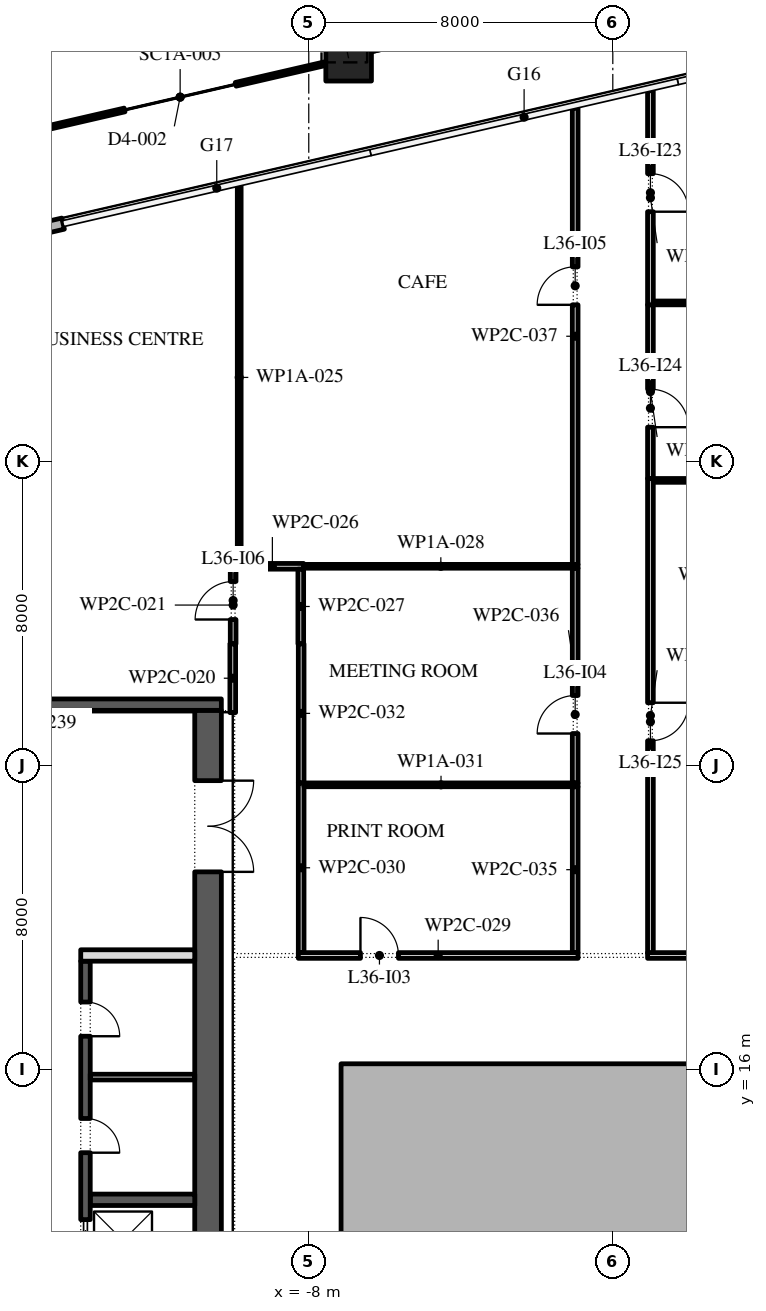
"""IFC4 building model, lengths in metres.
Left out: names, types, materials, properties, quantities, classifications, styles, units other than length and angle.
Written with IfcOpenShell. Run it as: python <this file> out.ifc"""

import sys

from ifc_helpers import new_model, si_unit, direction, frame, frame_2d, origin, origin_2d, place, context, subcontext, project, spatial, polyline, rectangle, outline, extrude, element, fill, save


model = new_model("IFC4")
c1 = context("Model", 3, precision=1e-05, world=origin(), true_north=direction((0.0, 1.0)))
c2 = subcontext(c1, "Body", "Model", "MODEL_VIEW")
j1 = project(units=[si_unit("LENGTHUNIT", "METRE"), si_unit("PLANEANGLEUNIT", "RADIAN")], contexts=[c1])
p1 = place(None, origin())
s1 = spatial("IfcSite", under=j1, at=p1, CompositionType="ELEMENT")
p2 = place(p1, origin())
s2 = spatial("IfcBuilding", under=s1, at=p2, CompositionType="ELEMENT")
p3 = place(p2, frame((0.0, 0.0, 165.6)))
s3 = spatial("IfcBuildingStorey", under=s2, at=p3, CompositionType="ELEMENT", Elevation=165.6)
p4 = place(p3, frame((-6.951, 42.608, 0.0), z_axis=(-0.018854392659, 0.081621274029, 0.996485062358), x_axis=(-0.974342226267, -0.225071602193, 0.0)))
e1 = element("IfcColumn", 1, at=p4, inside=s3, PredefinedType="COLUMN", context=c2, shape_type="SweptSolid", body=[
    extrude(rectangle(XDim=1.2, YDim=1.2, at=origin_2d()), origin(), (0.0, 0.0, 1.0), 6.021),
])
p5 = place(p3, origin())
e2 = element("IfcWall", 2, at=p5, inside=s3, PredefinedType="STANDARD", context=c2, shape_type="SweptSolid", body=[
    extrude(outline(polyline([(-7.15, -2.15), (7.15, -2.15), (7.15, 16.15), (-7.15, 16.15), (-7.15, -2.15)]), holes=[polyline([(-7.0, -2.0), (-7.0, 16.0), (7.0, 16.0), (7.0, -2.0), (-7.0, -2.0)])]), origin(), (0.0, 0.0, 1.0), 5.8),
])
p6 = place(p3, frame((-14.465, 38.256, 0.0), z_axis=(0.0, 0.0, 1.0), x_axis=(-0.974368386566, -0.224958323385, 0.0)))
e3 = element("IfcWall", 3, at=p6, inside=s3, PredefinedType="STANDARD", context=c2, shape_type="SweptSolid", body=[
    extrude(rectangle(XDim=8.3, YDim=0.3, at=frame_2d((4.15, 0.0))), origin(), (0.0, 0.0, 1.0), 5.8),
])
p7 = place(p6, frame((3.9, 0.0, 0.0)))
e4 = element("IfcOpeningElement", 4, at=p7, cuts=e3, PredefinedType="OPENING", context=c2, shape_type="SweptSolid", body=[
    extrude(rectangle(XDim=3.0, YDim=3.5, at=frame_2d((1.5, 1.75))), frame((0.0, 0.16, 0.0), z_axis=(0.0, -1.0, 0.0), x_axis=(1.0, 0.0, 0.0)), (0.0, 0.0, 1.0), 0.32),
])
p8 = place(p3, frame((-7.555, 42.469, 0.0), z_axis=(0.0, 0.0, 1.0), x_axis=(-0.974370774795, -0.22494797893, 0.0)))
e5 = element("IfcWall", 5, at=p8, inside=s3, PredefinedType="STANDARD", context=c2, shape_type="SweptSolid", body=[
    extrude(rectangle(XDim=7.86, YDim=0.1, at=frame_2d((3.93, 0.0))), origin(), (0.0, 0.0, 1.0), 5.8),
])
p9 = place(p8, frame((2.43, 0.0, 0.0)))
e6 = element("IfcOpeningElement", 6, at=p9, cuts=e5, PredefinedType="OPENING", context=c2, shape_type="SweptSolid", body=[
    extrude(rectangle(XDim=3.0, YDim=3.5, at=frame_2d((1.5, 1.75))), frame((0.0, 0.06, 0.0), z_axis=(0.0, -1.0, 0.0), x_axis=(1.0, 0.0, 0.0)), (0.0, 0.0, 1.0), 0.12),
])
p10 = place(p3, frame((-10.65, -2.45, 0.0), z_axis=(0.0, 0.0, 1.0), x_axis=(0.0, 1.0, 0.0)))
e7 = element("IfcWall", 7, at=p10, inside=s3, PredefinedType="SHEAR", context=c2, shape_type="SweptSolid", body=[
    extrude(rectangle(XDim=27.9, YDim=0.7, at=frame_2d((13.95, 0.0))), origin(), (0.0, 0.0, 1.0), 5.8),
])
p11 = place(p10, frame((23.65, 0.0, 0.0)))
e8 = element("IfcOpeningElement", 8, at=p11, cuts=e7, PredefinedType="OPENING", context=c2, shape_type="SweptSolid", body=[
    extrude(rectangle(XDim=2.4, YDim=2.1, at=frame_2d((1.2, 1.05))), frame((0.0, 0.36, 0.0), z_axis=(0.0, -1.0, 0.0), x_axis=(1.0, 0.0, 0.0)), (0.0, 0.0, 1.0), 0.72),
])
p12 = place(p10, frame((1.087, 0.0, 0.0)))
e9 = element("IfcOpeningElement", 9, at=p12, cuts=e7, PredefinedType="OPENING", context=c2, shape_type="SweptSolid", body=[
    extrude(rectangle(XDim=0.9, YDim=2.1, at=frame_2d((0.45, 1.05))), frame((0.0, 0.36, 0.0), z_axis=(0.0, -1.0, 0.0), x_axis=(1.0, 0.0, 0.0)), (0.0, 0.0, 1.0), 0.72),
])
p13 = place(p10, frame((4.262, 0.0, 0.0)))
e10 = element("IfcOpeningElement", 10, at=p13, cuts=e7, PredefinedType="OPENING", context=c2, shape_type="SweptSolid", body=[
    extrude(rectangle(XDim=1.0, YDim=2.1, at=frame_2d((0.5, 1.05))), frame((0.0, 0.36, 0.0), z_axis=(0.0, -1.0, 0.0), x_axis=(1.0, 0.0, 0.0)), (0.0, 0.0, 1.0), 0.72),
])
p14 = place(p3, frame((-21.7, 25.6, 0.0), z_axis=(0.0, 0.0, 1.0), x_axis=(1.0, 0.0, 0.0)))
e11 = element("IfcWall", 11, at=p14, inside=s3, PredefinedType="SHEAR", context=c2, shape_type="SweptSolid", body=[
    extrude(rectangle(XDim=11.4, YDim=0.3, at=frame_2d((5.7, 0.0))), origin(), (0.0, 0.0, 1.0), 5.8),
])
p15 = place(p3, frame((-13.75, 12.571, 0.0), z_axis=(0.0, 0.0, 1.0), x_axis=(1.0, 0.0, 0.0)))
e12 = element("IfcWall", 12, at=p15, inside=s3, PredefinedType="SHEAR", context=c2, shape_type="SweptSolid", body=[
    extrude(rectangle(XDim=2.75, YDim=0.3, at=frame_2d((1.375, 0.0))), origin(), (0.0, 0.0, 1.0), 5.8),
])
p16 = place(p3, frame((-13.875, -2.45, 0.0), z_axis=(0.0, 0.0, 1.0), x_axis=(0.0, 1.0, 0.0)))
e13 = element("IfcWall", 13, at=p16, inside=s3, PredefinedType="SHEAR", context=c2, shape_type="SweptSolid", body=[
    extrude(rectangle(XDim=21.3, YDim=0.25, at=frame_2d((10.65, 0.0))), origin(), (0.0, 0.0, 1.0), 5.8),
])
p17 = place(p16, frame((16.261, 0.0, 0.0)))
e14 = element("IfcOpeningElement", 14, at=p17, cuts=e13, PredefinedType="OPENING", context=c2, shape_type="SweptSolid", body=[
    extrude(rectangle(XDim=0.9, YDim=2.1, at=frame_2d((0.45, 1.05))), frame((0.0, 0.135, 0.0), z_axis=(0.0, -1.0, 0.0), x_axis=(1.0, 0.0, 0.0)), (0.0, 0.0, 1.0), 0.27),
])
p18 = place(p16, frame((19.325, 0.0, 0.0)))
e15 = element("IfcOpeningElement", 15, at=p18, cuts=e13, PredefinedType="OPENING", context=c2, shape_type="SweptSolid", body=[
    extrude(rectangle(XDim=0.9, YDim=2.1, at=frame_2d((0.45, 1.05))), frame((0.0, 0.135, 0.0), z_axis=(0.0, -1.0, 0.0), x_axis=(1.0, 0.0, 0.0)), (0.0, 0.0, 1.0), 0.27),
])
p19 = place(p16, frame((6.971, 0.0, 0.0)))
e16 = element("IfcOpeningElement", 16, at=p19, cuts=e13, PredefinedType="OPENING", context=c2, shape_type="SweptSolid", body=[
    extrude(rectangle(XDim=1.1, YDim=2.1, at=frame_2d((0.55, 1.05))), frame((0.0, 0.135, 0.0), z_axis=(0.0, -1.0, 0.0), x_axis=(1.0, 0.0, 0.0)), (0.0, 0.0, 1.0), 0.27),
])
p20 = place(p16, frame((9.114, 0.0, 0.0)))
e17 = element("IfcOpeningElement", 17, at=p20, cuts=e13, PredefinedType="OPENING", context=c2, shape_type="SweptSolid", body=[
    extrude(rectangle(XDim=1.1, YDim=2.1, at=frame_2d((0.55, 1.05))), frame((0.0, 0.135, 0.0), z_axis=(0.0, -1.0, 0.0), x_axis=(1.0, 0.0, 0.0)), (0.0, 0.0, 1.0), 0.27),
])
p21 = place(p16, frame((11.257, 0.0, 0.0)))
e18 = element("IfcOpeningElement", 18, at=p21, cuts=e13, PredefinedType="OPENING", context=c2, shape_type="SweptSolid", body=[
    extrude(rectangle(XDim=1.1, YDim=2.1, at=frame_2d((0.55, 1.05))), frame((0.0, 0.135, 0.0), z_axis=(0.0, -1.0, 0.0), x_axis=(1.0, 0.0, 0.0)), (0.0, 0.0, 1.0), 0.27),
])
p22 = place(p16, frame((13.4, 0.0, 0.0)))
e19 = element("IfcOpeningElement", 19, at=p22, cuts=e13, PredefinedType="OPENING", context=c2, shape_type="SweptSolid", body=[
    extrude(rectangle(XDim=1.1, YDim=2.1, at=frame_2d((0.55, 1.05))), frame((0.0, 0.135, 0.0), z_axis=(0.0, -1.0, 0.0), x_axis=(1.0, 0.0, 0.0)), (0.0, 0.0, 1.0), 0.27),
])
p23 = place(p3, frame((-14.0, 19.0, 0.0), z_axis=(0.0, 0.0, 1.0), x_axis=(1.0, 0.0, 0.0)))
e20 = element("IfcWall", 20, at=p23, inside=s3, PredefinedType="PARTITIONING", context=c2, shape_type="SweptSolid", body=[
    extrude(rectangle(XDim=3.0, YDim=0.3, at=frame_2d((1.5, 0.0))), origin(), (0.0, 0.0, 1.0), 5.8),
])
p24 = place(p3, frame((-13.75, 15.8, 0.0), z_axis=(0.0, 0.0, 1.0), x_axis=(1.0, 0.0, 0.0)))
e21 = element("IfcWall", 21, at=p24, inside=s3, PredefinedType="PARTITIONING", context=c2, shape_type="SweptSolid", body=[
    extrude(rectangle(XDim=2.75, YDim=0.15, at=frame_2d((1.375, 0.0))), origin(), (0.0, 0.0, 1.0), 5.8),
])
p25 = place(p3, frame((-10.0, 25.39, 0.0), z_axis=(0.0, 0.0, 1.0), x_axis=(0.0, 1.0, 0.0)))
e22 = element("IfcWall", 22, at=p25, inside=s3, PredefinedType="PARTITIONING", context=c2, shape_type="SweptSolid", body=[
    extrude(rectangle(XDim=1.81, YDim=0.15, at=frame_2d((0.905, 0.0))), origin(), (0.0, 0.0, 1.0), 5.8),
])
p26 = place(p3, frame((-9.99, 27.2, 0.0), z_axis=(0.0, 0.0, 1.0), x_axis=(0.0, 1.0, 0.0)))
e23 = element("IfcWall", 23, at=p26, inside=s3, PredefinedType="PARTITIONING", context=c2, shape_type="SweptSolid", body=[
    extrude(rectangle(XDim=2.04, YDim=0.15, at=frame_2d((1.02, 0.0))), origin(), (0.0, 0.0, 1.0), 5.8),
])
p27 = place(p26, frame((0.64, 0.0, 0.0)))
e24 = element("IfcOpeningElement", 24, at=p27, cuts=e23, PredefinedType="OPENING", context=c2, shape_type="SweptSolid", body=[
    extrude(rectangle(XDim=1.0, YDim=2.1, at=frame_2d((0.5, 1.05))), frame((0.0, 0.085, 0.0), z_axis=(0.0, -1.0, 0.0), x_axis=(1.0, 0.0, 0.0)), (0.0, 0.0, 1.0), 0.17),
])
p28 = place(p3, frame((-9.83, 29.165, 0.0), z_axis=(0.0, 0.0, 1.0), x_axis=(0.0, 1.0, 0.0)))
e25 = element("IfcWall", 25, at=p28, inside=s3, PredefinedType="PARTITIONING", context=c2, shape_type="SweptSolid", body=[
    extrude(rectangle(XDim=10.09, YDim=0.1, at=frame_2d((5.045, 0.0))), origin(), (0.0, 0.0, 1.0), 5.8),
])
p29 = place(p3, frame((-9.78, 29.24, 0.0), z_axis=(0.0, 0.0, 1.0), x_axis=(1.0, 0.0, 0.0)))
e26 = element("IfcWall", 26, at=p29, inside=s3, PredefinedType="PARTITIONING", context=c2, shape_type="SweptSolid", body=[
    extrude(rectangle(XDim=1.645, YDim=0.15, at=frame_2d((0.823, 0.0))), origin(), (0.0, 0.0, 1.0), 5.8),
])
p30 = place(p3, frame((-8.21, 29.165, 0.0), z_axis=(0.0, 0.0, 1.0), x_axis=(0.0, -1.0, 0.0)))
e27 = element("IfcWall", 27, at=p30, inside=s3, PredefinedType="PARTITIONING", context=c2, shape_type="SweptSolid", body=[
    extrude(rectangle(XDim=1.965, YDim=0.15, at=frame_2d((0.982, 0.0))), origin(), (0.0, 0.0, 1.0), 5.8),
])
p31 = place(p3, frame((-8.135, 29.24, 0.0), z_axis=(0.0, 0.0, 1.0), x_axis=(1.0, 0.0, 0.0)))
e28 = element("IfcWall", 28, at=p31, inside=s3, PredefinedType="PARTITIONING", context=c2, shape_type="SweptSolid", body=[
    extrude(rectangle(XDim=7.22, YDim=0.1, at=frame_2d((3.61, 0.0))), origin(), (0.0, 0.0, 1.0), 5.8),
])
p32 = place(p3, frame((-8.275, 19.0, 0.0), z_axis=(0.0, 0.0, 1.0), x_axis=(1.0, 0.0, 0.0)))
e29 = element("IfcWall", 29, at=p32, inside=s3, PredefinedType="PARTITIONING", context=c2, shape_type="SweptSolid", body=[
    extrude(rectangle(XDim=7.36, YDim=0.15, at=frame_2d((3.68, 0.0))), origin(), (0.0, 0.0, 1.0), 5.8),
])
p33 = place(p32, frame((1.635, 0.0, 0.0)))
e30 = element("IfcOpeningElement", 30, at=p33, cuts=e29, PredefinedType="OPENING", context=c2, shape_type="SweptSolid", body=[
    extrude(rectangle(XDim=1.0, YDim=2.1, at=frame_2d((0.5, 1.05))), frame((0.0, 0.085, 0.0), z_axis=(0.0, -1.0, 0.0), x_axis=(1.0, 0.0, 0.0)), (0.0, 0.0, 1.0), 0.17),
])
p34 = place(p3, frame((-8.2, 23.54, 0.0), z_axis=(0.0, 0.0, 1.0), x_axis=(0.0, -1.0, 0.0)))
e31 = element("IfcWall", 31, at=p34, inside=s3, PredefinedType="PARTITIONING", context=c2, shape_type="SweptSolid", body=[
    extrude(rectangle(XDim=4.465, YDim=0.15, at=frame_2d((2.232, 0.0))), origin(), (0.0, 0.0, 1.0), 5.8),
])
p35 = place(p3, frame((-8.125, 23.49, 0.0), z_axis=(0.0, 0.0, 1.0), x_axis=(1.0, 0.0, 0.0)))
e32 = element("IfcWall", 32, at=p35, inside=s3, PredefinedType="PARTITIONING", context=c2, shape_type="SweptSolid", body=[
    extrude(rectangle(XDim=7.21, YDim=0.1, at=frame_2d((3.605, 0.0))), origin(), (0.0, 0.0, 1.0), 5.8),
])
p36 = place(p3, frame((-8.2, 27.2, 0.0), z_axis=(0.0, 0.0, 1.0), x_axis=(0.0, -1.0, 0.0)))
e33 = element("IfcWall", 33, at=p36, inside=s3, PredefinedType="PARTITIONING", context=c2, shape_type="SweptSolid", body=[
    extrude(rectangle(XDim=3.66, YDim=0.15, at=frame_2d((1.83, 0.0))), origin(), (0.0, 0.0, 1.0), 5.8),
])
p37 = place(p3, frame((-0.99, 19.075, 0.0), z_axis=(0.0, 0.0, 1.0), x_axis=(0.0, 1.0, 0.0)))
e34 = element("IfcWall", 34, at=p37, inside=s3, PredefinedType="PARTITIONING", context=c2, shape_type="SweptSolid", body=[
    extrude(rectangle(XDim=4.365, YDim=0.15, at=frame_2d((2.183, 0.0))), origin(), (0.0, 0.0, 1.0), 5.8),
])
p38 = place(p3, frame((-0.99, 23.54, 0.0), z_axis=(0.0, 0.0, 1.0), x_axis=(0.0, 1.0, 0.0)))
e35 = element("IfcWall", 35, at=p38, inside=s3, PredefinedType="PARTITIONING", context=c2, shape_type="SweptSolid", body=[
    extrude(rectangle(XDim=5.65, YDim=0.15, at=frame_2d((2.825, 0.0))), origin(), (0.0, 0.0, 1.0), 5.8),
])
p39 = place(p38, frame((1.3, 0.0, 0.0)))
e36 = element("IfcOpeningElement", 36, at=p39, cuts=e35, PredefinedType="OPENING", context=c2, shape_type="SweptSolid", body=[
    extrude(rectangle(XDim=1.0, YDim=2.1, at=frame_2d((0.5, 1.05))), frame((0.0, 0.085, 0.0), z_axis=(0.0, -1.0, 0.0), x_axis=(1.0, 0.0, 0.0)), (0.0, 0.0, 1.0), 0.17),
])
p40 = place(p3, frame((-0.99, 29.29, 0.0), z_axis=(0.0, 0.0, 1.0), x_axis=(0.0, 1.0, 0.0)))
e37 = element("IfcWall", 37, at=p40, inside=s3, PredefinedType="PARTITIONING", context=c2, shape_type="SweptSolid", body=[
    extrude(rectangle(XDim=12.006, YDim=0.15, at=frame_2d((6.003, 0.0))), origin(), (0.0, 0.0, 1.0), 5.8),
])
p41 = place(p40, frame((6.83, 0.0, 0.0)))
e38 = element("IfcOpeningElement", 38, at=p41, cuts=e37, PredefinedType="OPENING", context=c2, shape_type="SweptSolid", body=[
    extrude(rectangle(XDim=1.0, YDim=2.1, at=frame_2d((0.5, 1.05))), frame((0.0, 0.085, 0.0), z_axis=(0.0, -1.0, 0.0), x_axis=(1.0, 0.0, 0.0)), (0.0, 0.0, 1.0), 0.17),
])
p42 = place(p3, frame((0.915, 19.0, 0.0), z_axis=(0.0, 0.0, 1.0), x_axis=(1.0, 0.0, 0.0)))
e39 = element("IfcWall", 39, at=p42, inside=s3, PredefinedType="PARTITIONING", context=c2, shape_type="SweptSolid", body=[
    extrude(rectangle(XDim=7.36, YDim=0.15, at=frame_2d((3.68, 0.0))), origin(), (0.0, 0.0, 1.0), 5.8),
])
p43 = place(p3, frame((0.99, 31.55, 0.0), z_axis=(0.0, 0.0, 1.0), x_axis=(0.0, -1.0, 0.0)))
e40 = element("IfcWall", 40, at=p43, inside=s3, PredefinedType="PARTITIONING", context=c2, shape_type="SweptSolid", body=[
    extrude(rectangle(XDim=12.475, YDim=0.15, at=frame_2d((6.238, 0.0))), origin(), (0.0, 0.0, 1.0), 5.8),
])
p44 = place(p43, frame((5.9, 0.0, 0.0)))
e41 = element("IfcOpeningElement", 41, at=p44, cuts=e40, PredefinedType="OPENING", context=c2, shape_type="SweptSolid", body=[
    extrude(rectangle(XDim=1.0, YDim=2.1, at=frame_2d((0.5, 1.05))), frame((0.0, 0.085, 0.0), z_axis=(0.0, -1.0, 0.0), x_axis=(1.0, 0.0, 0.0)), (0.0, 0.0, 1.0), 0.17),
])
p45 = place(p3, frame((0.99, 36.12, 0.0), z_axis=(0.0, 0.0, 1.0), x_axis=(0.0, -1.0, 0.0)))
e42 = element("IfcWall", 42, at=p45, inside=s3, PredefinedType="PARTITIONING", context=c2, shape_type="SweptSolid", body=[
    extrude(rectangle(XDim=4.57, YDim=0.15, at=frame_2d((2.285, 0.0))), origin(), (0.0, 0.0, 1.0), 5.8),
])
p46 = place(p45, frame((2.22, 0.0, 0.0)))
e43 = element("IfcOpeningElement", 43, at=p46, cuts=e42, PredefinedType="OPENING", context=c2, shape_type="SweptSolid", body=[
    extrude(rectangle(XDim=1.0, YDim=2.1, at=frame_2d((0.5, 1.05))), frame((0.0, 0.085, 0.0), z_axis=(0.0, -1.0, 0.0), x_axis=(1.0, 0.0, 0.0)), (0.0, 0.0, 1.0), 0.17),
])
p47 = place(p3, frame((0.99, 41.753, 0.0), z_axis=(0.0, 0.0, 1.0), x_axis=(0.0, -1.0, 0.0)))
e44 = element("IfcWall", 44, at=p47, inside=s3, PredefinedType="PARTITIONING", context=c2, shape_type="SweptSolid", body=[
    extrude(rectangle(XDim=5.633, YDim=0.15, at=frame_2d((2.816, 0.0))), origin(), (0.0, 0.0, 1.0), 5.8),
])
p48 = place(p47, frame((2.183, 0.0, 0.0)))
e45 = element("IfcOpeningElement", 45, at=p48, cuts=e44, PredefinedType="OPENING", context=c2, shape_type="SweptSolid", body=[
    extrude(rectangle(XDim=1.0, YDim=2.1, at=frame_2d((0.5, 1.05))), frame((0.0, 0.085, 0.0), z_axis=(0.0, -1.0, 0.0), x_axis=(1.0, 0.0, 0.0)), (0.0, 0.0, 1.0), 0.17),
])
p49 = place(p3, frame((6.39, 36.17, 0.0), z_axis=(0.0, 0.0, 1.0), x_axis=(-1.0, 0.0, 0.0)))
e46 = element("IfcWall", 46, at=p49, inside=s3, PredefinedType="PARTITIONING", context=c2, shape_type="SweptSolid", body=[
    extrude(rectangle(XDim=5.325, YDim=0.1, at=frame_2d((2.663, 0.0))), origin(), (0.0, 0.0, 1.0), 5.8),
])
p50 = place(p3, frame((14.48, 31.5, 0.0), z_axis=(0.0, 0.0, 1.0), x_axis=(-1.0, 0.0, 0.0)))
e47 = element("IfcWall", 47, at=p50, inside=s3, PredefinedType="PARTITIONING", context=c2, shape_type="SweptSolid", body=[
    extrude(rectangle(XDim=13.415, YDim=0.1, at=frame_2d((6.708, 0.0))), origin(), (0.0, 0.0, 1.0), 5.8),
])
p51 = place(p9, origin())
e48 = element("IfcDoor", 48, at=p51, inside=s3, OperationType="DOUBLE_DOOR_SLIDING", PredefinedType="DOOR", context=c2, shape_type="SweptSolid", body=[
    extrude(rectangle(XDim=3.0, YDim=3.5, at=frame_2d((1.5, 1.75))), frame((0.0, 0.025, 0.0), z_axis=(0.0, -1.0, 0.0), x_axis=(1.0, 0.0, 0.0)), (0.0, 0.0, 1.0), 0.05),
])
fill(e6, e48)
p52 = place(p17, frame((0.9, -0.2, 0.0), z_axis=(0.0, 0.0, 1.0), x_axis=(-1.0, 0.0, 0.0)))
e49 = element("IfcDoor", 49, at=p52, inside=s3, OperationType="SINGLE_SWING_LEFT", PredefinedType="DOOR", context=c2, shape_type="SweptSolid", body=[
    extrude(rectangle(XDim=0.9, YDim=2.1, at=frame_2d((0.45, 1.05))), frame((0.0, -0.075, 0.0), z_axis=(0.0, -1.0, 0.0), x_axis=(1.0, 0.0, 0.0)), (0.0, 0.0, 1.0), 0.05),
])
fill(e14, e49)
p53 = place(p18, frame((0.9, -0.2, 0.0), z_axis=(0.0, 0.0, 1.0), x_axis=(-1.0, 0.0, 0.0)))
e50 = element("IfcDoor", 50, at=p53, inside=s3, OperationType="SINGLE_SWING_LEFT", PredefinedType="DOOR", context=c2, shape_type="SweptSolid", body=[
    extrude(rectangle(XDim=0.9, YDim=2.1, at=frame_2d((0.45, 1.05))), frame((0.0, -0.075, 0.0), z_axis=(0.0, -1.0, 0.0), x_axis=(1.0, 0.0, 0.0)), (0.0, 0.0, 1.0), 0.05),
])
fill(e15, e50)
p54 = place(p22, origin())
e51 = element("IfcDoor", 51, at=p54, inside=s3, OperationType="SLIDING_TO_LEFT", PredefinedType="DOOR", context=c2, shape_type="SweptSolid", body=[
    extrude(rectangle(XDim=1.1, YDim=2.1, at=frame_2d((0.55, 1.05))), frame((0.0, 0.025, 0.0), z_axis=(0.0, -1.0, 0.0), x_axis=(1.0, 0.0, 0.0)), (0.0, 0.0, 1.0), 0.05),
])
fill(e19, e51)
p55 = place(p11, frame((2.4, 0.0, 0.0), z_axis=(0.0, 0.0, 1.0), x_axis=(-1.0, 0.0, 0.0)))
e52 = element("IfcDoor", 52, at=p55, inside=s3, OperationType="DOUBLE_DOOR_SINGLE_SWING", PredefinedType="DOOR", context=c2, shape_type="SweptSolid", body=[
    extrude(rectangle(XDim=2.4, YDim=2.1, at=frame_2d((1.2, 1.05))), frame((0.0, 0.025, 0.0), z_axis=(0.0, -1.0, 0.0), x_axis=(1.0, 0.0, 0.0)), (0.0, 0.0, 1.0), 0.05),
])
fill(e8, e52)
p56 = place(p33, origin())
e53 = element("IfcDoor", 53, at=p56, inside=s3, OperationType="SINGLE_SWING_RIGHT", PredefinedType="DOOR", context=c2, shape_type="SweptSolid", body=[
    extrude(rectangle(XDim=1.0, YDim=2.1, at=frame_2d((0.5, 1.05))), frame((0.0, 0.025, 0.0), z_axis=(0.0, -1.0, 0.0), x_axis=(1.0, 0.0, 0.0)), (0.0, 0.0, 1.0), 0.05),
])
fill(e30, e53)
p57 = place(p39, origin())
e54 = element("IfcDoor", 54, at=p57, inside=s3, OperationType="SINGLE_SWING_RIGHT", PredefinedType="DOOR", context=c2, shape_type="SweptSolid", body=[
    extrude(rectangle(XDim=1.0, YDim=2.1, at=frame_2d((0.5, 1.05))), frame((0.0, 0.025, 0.0), z_axis=(0.0, -1.0, 0.0), x_axis=(1.0, 0.0, 0.0)), (0.0, 0.0, 1.0), 0.05),
])
fill(e36, e54)
p58 = place(p41, origin())
e55 = element("IfcDoor", 55, at=p58, inside=s3, OperationType="SINGLE_SWING_RIGHT", PredefinedType="DOOR", context=c2, shape_type="SweptSolid", body=[
    extrude(rectangle(XDim=1.0, YDim=2.1, at=frame_2d((0.5, 1.05))), frame((0.0, 0.025, 0.0), z_axis=(0.0, -1.0, 0.0), x_axis=(1.0, 0.0, 0.0)), (0.0, 0.0, 1.0), 0.05),
])
fill(e38, e55)
p59 = place(p27, origin())
e56 = element("IfcDoor", 56, at=p59, inside=s3, OperationType="SINGLE_SWING_RIGHT", PredefinedType="DOOR", context=c2, shape_type="SweptSolid", body=[
    extrude(rectangle(XDim=1.0, YDim=2.1, at=frame_2d((0.5, 1.05))), frame((0.0, 0.025, 0.0), z_axis=(0.0, -1.0, 0.0), x_axis=(1.0, 0.0, 0.0)), (0.0, 0.0, 1.0), 0.05),
])
fill(e24, e56)
p60 = place(p48, origin())
e57 = element("IfcDoor", 57, at=p60, inside=s3, OperationType="SINGLE_SWING_LEFT", PredefinedType="DOOR", context=c2, shape_type="SweptSolid", body=[
    extrude(rectangle(XDim=1.0, YDim=2.1, at=frame_2d((0.5, 1.05))), frame((0.0, 0.025, 0.0), z_axis=(0.0, -1.0, 0.0), x_axis=(1.0, 0.0, 0.0)), (0.0, 0.0, 1.0), 0.05),
])
fill(e45, e57)
p61 = place(p46, origin())
e58 = element("IfcDoor", 58, at=p61, inside=s3, OperationType="SINGLE_SWING_LEFT", PredefinedType="DOOR", context=c2, shape_type="SweptSolid", body=[
    extrude(rectangle(XDim=1.0, YDim=2.1, at=frame_2d((0.5, 1.05))), frame((0.0, 0.025, 0.0), z_axis=(0.0, -1.0, 0.0), x_axis=(1.0, 0.0, 0.0)), (0.0, 0.0, 1.0), 0.05),
])
fill(e43, e58)
p62 = place(p44, origin())
e59 = element("IfcDoor", 59, at=p62, inside=s3, OperationType="SINGLE_SWING_RIGHT", PredefinedType="DOOR", context=c2, shape_type="SweptSolid", body=[
    extrude(rectangle(XDim=1.0, YDim=2.1, at=frame_2d((0.5, 1.05))), frame((0.0, 0.025, 0.0), z_axis=(0.0, -1.0, 0.0), x_axis=(1.0, 0.0, 0.0)), (0.0, 0.0, 1.0), 0.05),
])
fill(e41, e59)
save(model, sys.argv[1])
